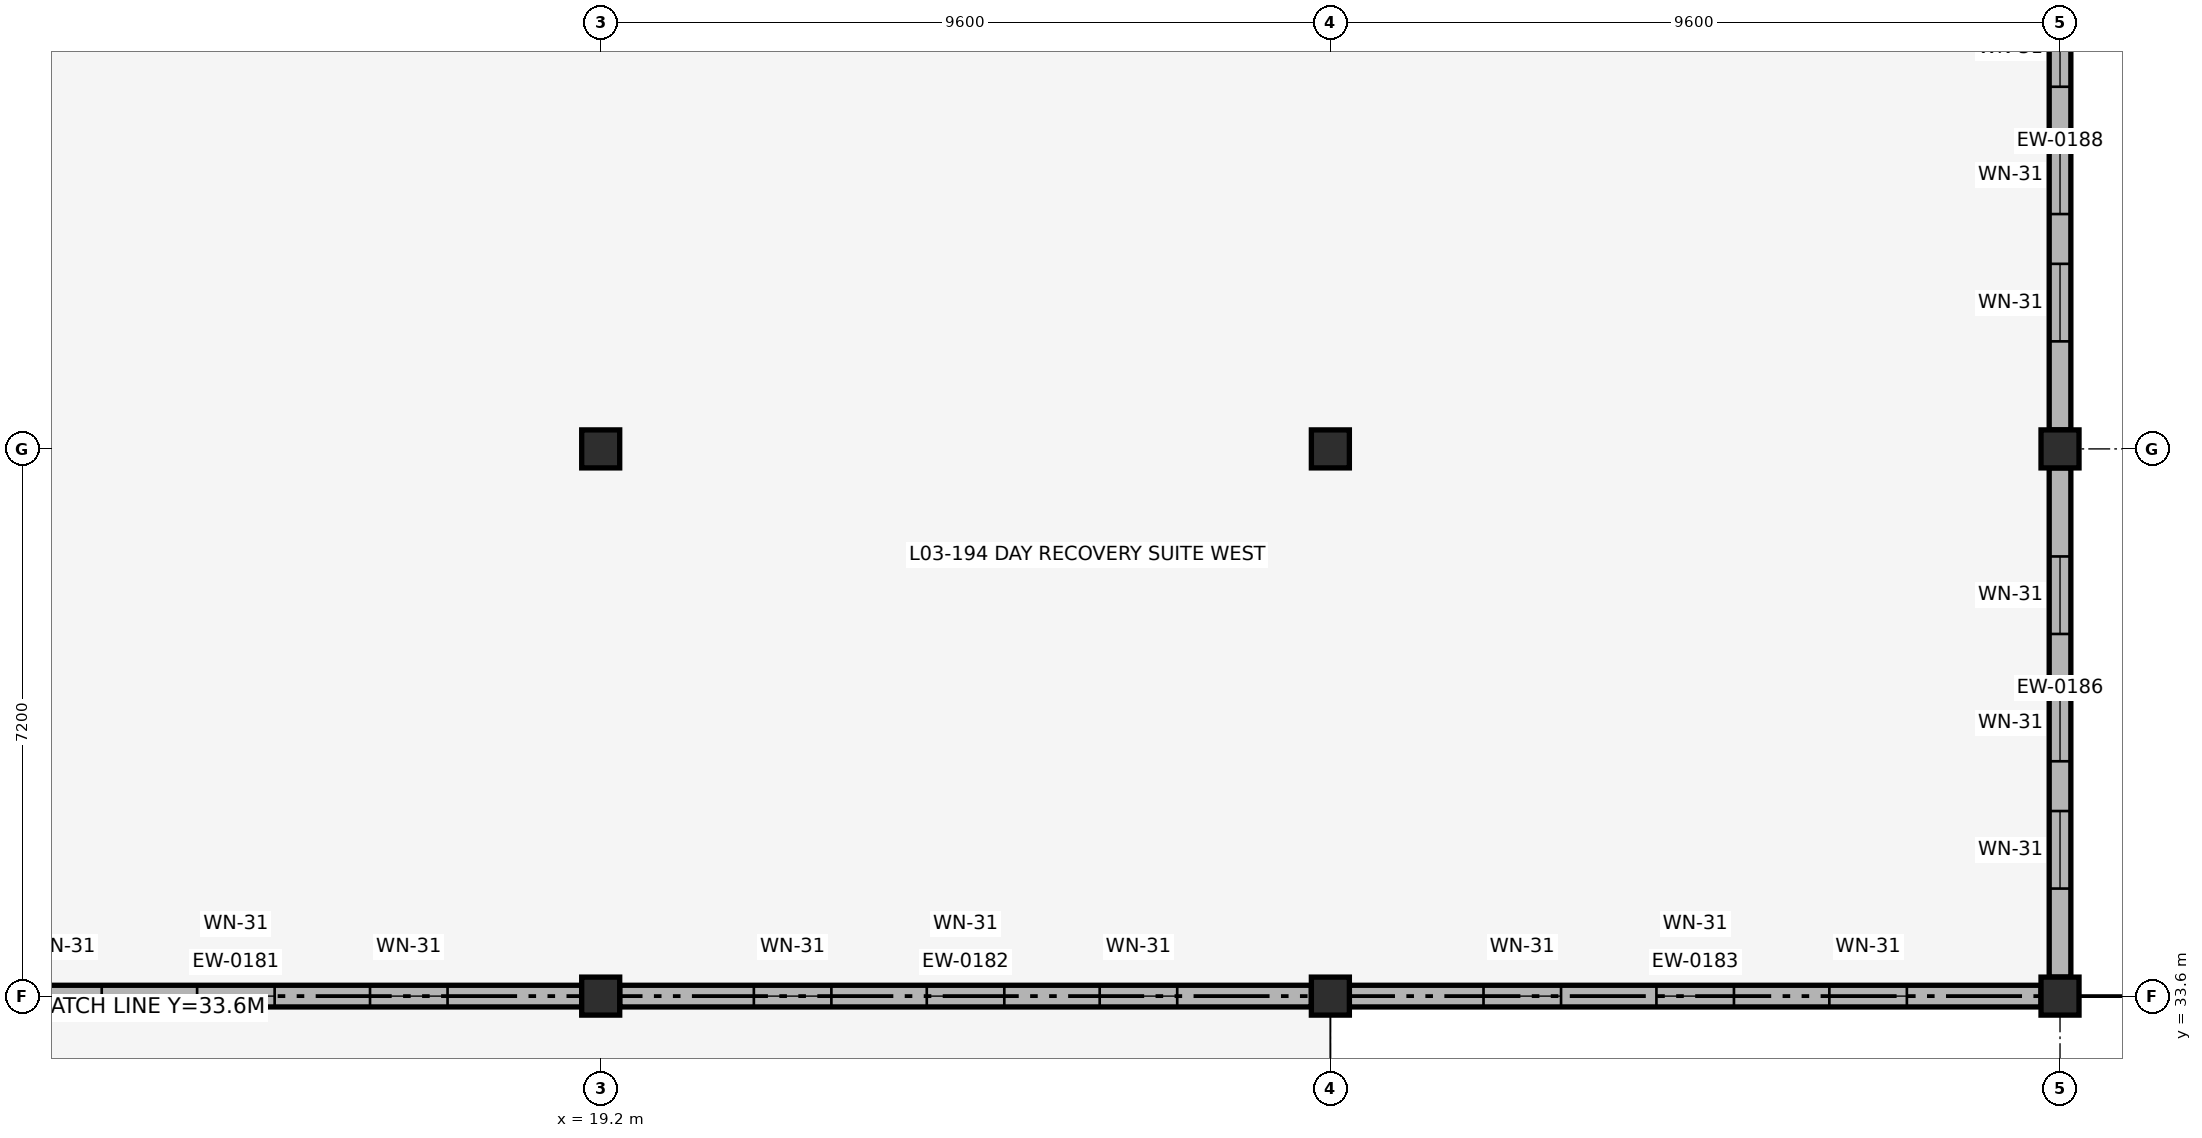
"""IFC4 building model, lengths in metres.
Left out: names, types, materials, properties, quantities, classifications, styles, units other than length and angle.
Written with IfcOpenShell. Run it as: python <this file> out.ifc"""

import sys

from ifc_helpers import new_model, si_unit, direction, frame, frame_2d, origin, origin_2d, place, context, subcontext, project, spatial, rectangle, extrude, element, fill, save


model = new_model("IFC4")
c1 = context("Model", 3, precision=1e-05, world=origin(), true_north=direction((0.0, 1.0)))
c2 = subcontext(c1, "Body", "Model", "MODEL_VIEW")
j1 = project(units=[si_unit("LENGTHUNIT", "METRE"), si_unit("PLANEANGLEUNIT", "RADIAN")], contexts=[c1])
p1 = place(None, origin())
s1 = spatial("IfcSite", under=j1, at=p1, CompositionType="ELEMENT")
p2 = place(p1, origin())
s2 = spatial("IfcBuilding", under=s1, at=p2, CompositionType="ELEMENT")
p3 = place(p2, frame((0.0, 0.0, 12.58)))
s3 = spatial("IfcBuildingStorey", under=s2, at=p3, CompositionType="ELEMENT", Elevation=12.58)
for number, where, z_axis, x_axis in (
    (1, (19.2, 33.6, 0.0), (0.0, 0.0, 1.0), (1.0, 0.0, 0.0)),
    (2, (19.2, 40.8, 0.0), (0.0, 0.0, 1.0), (1.0, 0.0, 0.0)),
    (3, (28.8, 33.6, 0.0), (0.0, 0.0, 1.0), (1.0, 0.0, 0.0)),
    (4, (28.8, 40.8, 0.0), (0.0, 0.0, 1.0), (1.0, 0.0, 0.0)),
    (5, (38.4, 33.6, 0.0), (0.0, 0.0, 1.0), (1.0, 0.0, 0.0)),
    (6, (38.4, 40.8, 0.0), (0.0, 0.0, 1.0), (1.0, 0.0, 0.0)),
):
    element("IfcColumn", number, at=place(p3, frame(where, z_axis=z_axis, x_axis=x_axis)), inside=s3, PredefinedType="COLUMN", context=c2, shape_type="SweptSolid", body=[
        extrude(rectangle(XDim=0.5, YDim=0.5, at=origin_2d()), origin(), (0.0, 0.0, 1.0), 4.08),
    ])
p4 = place(p3, frame((9.85, 33.6, 0.0), z_axis=(0.0, 0.0, 1.0), x_axis=(1.0, 0.0, 0.0)))
e7 = element("IfcWall", 7, at=p4, inside=s3, PredefinedType="SOLIDWALL", context=c2, shape_type="SweptSolid", body=[
    extrude(rectangle(XDim=9.1, YDim=0.285, at=frame_2d((4.55, 0.0))), origin(), (0.0, 0.0, 1.0), 3.06),
])
p5 = place(p4, frame((1.765, 0.0, 0.88)))
e8 = element("IfcOpeningElement", 8, at=p5, cuts=e7, PredefinedType="OPENING", context=c2, shape_type="SweptSolid", body=[
    extrude(rectangle(XDim=1.02, YDim=1.88, at=frame_2d((0.51, 0.94))), frame((0.0, 0.152, 0.0), z_axis=(0.0, -1.0, 0.0), x_axis=(1.0, 0.0, 0.0)), (0.0, 0.0, 1.0), 0.305),
])
p6 = place(p4, frame((4.04, 0.0, 0.88)))
e9 = element("IfcOpeningElement", 9, at=p6, cuts=e7, PredefinedType="OPENING", context=c2, shape_type="SweptSolid", body=[
    extrude(rectangle(XDim=1.02, YDim=1.88, at=frame_2d((0.51, 0.94))), frame((0.0, 0.152, 0.0), z_axis=(0.0, -1.0, 0.0), x_axis=(1.0, 0.0, 0.0)), (0.0, 0.0, 1.0), 0.305),
])
p7 = place(p4, frame((6.315, 0.0, 0.88)))
e10 = element("IfcOpeningElement", 10, at=p7, cuts=e7, PredefinedType="OPENING", context=c2, shape_type="SweptSolid", body=[
    extrude(rectangle(XDim=1.02, YDim=1.88, at=frame_2d((0.51, 0.94))), frame((0.0, 0.152, 0.0), z_axis=(0.0, -1.0, 0.0), x_axis=(1.0, 0.0, 0.0)), (0.0, 0.0, 1.0), 0.305),
])
p8 = place(p3, frame((19.45, 33.6, 0.0), z_axis=(0.0, 0.0, 1.0), x_axis=(1.0, 0.0, 0.0)))
e11 = element("IfcWall", 11, at=p8, inside=s3, PredefinedType="SOLIDWALL", context=c2, shape_type="SweptSolid", body=[
    extrude(rectangle(XDim=9.1, YDim=0.285, at=frame_2d((4.55, 0.0))), origin(), (0.0, 0.0, 1.0), 3.06),
])
p9 = place(p8, frame((1.765, 0.0, 0.88)))
e12 = element("IfcOpeningElement", 12, at=p9, cuts=e11, PredefinedType="OPENING", context=c2, shape_type="SweptSolid", body=[
    extrude(rectangle(XDim=1.02, YDim=1.88, at=frame_2d((0.51, 0.94))), frame((0.0, 0.152, 0.0), z_axis=(0.0, -1.0, 0.0), x_axis=(1.0, 0.0, 0.0)), (0.0, 0.0, 1.0), 0.305),
])
p10 = place(p8, frame((4.04, 0.0, 0.88)))
e13 = element("IfcOpeningElement", 13, at=p10, cuts=e11, PredefinedType="OPENING", context=c2, shape_type="SweptSolid", body=[
    extrude(rectangle(XDim=1.02, YDim=1.88, at=frame_2d((0.51, 0.94))), frame((0.0, 0.152, 0.0), z_axis=(0.0, -1.0, 0.0), x_axis=(1.0, 0.0, 0.0)), (0.0, 0.0, 1.0), 0.305),
])
p11 = place(p8, frame((6.315, 0.0, 0.88)))
e14 = element("IfcOpeningElement", 14, at=p11, cuts=e11, PredefinedType="OPENING", context=c2, shape_type="SweptSolid", body=[
    extrude(rectangle(XDim=1.02, YDim=1.88, at=frame_2d((0.51, 0.94))), frame((0.0, 0.152, 0.0), z_axis=(0.0, -1.0, 0.0), x_axis=(1.0, 0.0, 0.0)), (0.0, 0.0, 1.0), 0.305),
])
p12 = place(p3, frame((29.05, 33.6, 0.0), z_axis=(0.0, 0.0, 1.0), x_axis=(1.0, 0.0, 0.0)))
e15 = element("IfcWall", 15, at=p12, inside=s3, PredefinedType="SOLIDWALL", context=c2, shape_type="SweptSolid", body=[
    extrude(rectangle(XDim=9.1, YDim=0.285, at=frame_2d((4.55, 0.0))), origin(), (0.0, 0.0, 1.0), 3.06),
])
p13 = place(p12, frame((1.765, 0.0, 0.88)))
e16 = element("IfcOpeningElement", 16, at=p13, cuts=e15, PredefinedType="OPENING", context=c2, shape_type="SweptSolid", body=[
    extrude(rectangle(XDim=1.02, YDim=1.88, at=frame_2d((0.51, 0.94))), frame((0.0, 0.152, 0.0), z_axis=(0.0, -1.0, 0.0), x_axis=(1.0, 0.0, 0.0)), (0.0, 0.0, 1.0), 0.305),
])
p14 = place(p12, frame((4.04, 0.0, 0.88)))
e17 = element("IfcOpeningElement", 17, at=p14, cuts=e15, PredefinedType="OPENING", context=c2, shape_type="SweptSolid", body=[
    extrude(rectangle(XDim=1.02, YDim=1.88, at=frame_2d((0.51, 0.94))), frame((0.0, 0.152, 0.0), z_axis=(0.0, -1.0, 0.0), x_axis=(1.0, 0.0, 0.0)), (0.0, 0.0, 1.0), 0.305),
])
p15 = place(p12, frame((6.315, 0.0, 0.88)))
e18 = element("IfcOpeningElement", 18, at=p15, cuts=e15, PredefinedType="OPENING", context=c2, shape_type="SweptSolid", body=[
    extrude(rectangle(XDim=1.02, YDim=1.88, at=frame_2d((0.51, 0.94))), frame((0.0, 0.152, 0.0), z_axis=(0.0, -1.0, 0.0), x_axis=(1.0, 0.0, 0.0)), (0.0, 0.0, 1.0), 0.305),
])
p16 = place(p3, frame((38.4, 33.85, 0.0), z_axis=(0.0, 0.0, 1.0), x_axis=(0.0, 1.0, 0.0)))
e19 = element("IfcWall", 19, at=p16, inside=s3, PredefinedType="SOLIDWALL", context=c2, shape_type="SweptSolid", body=[
    extrude(rectangle(XDim=6.7, YDim=0.285, at=frame_2d((3.35, 0.0))), origin(), (0.0, 0.0, 1.0), 3.06),
])
p17 = place(p16, frame((1.165, 0.0, 0.88)))
e20 = element("IfcOpeningElement", 20, at=p17, cuts=e19, PredefinedType="OPENING", context=c2, shape_type="SweptSolid", body=[
    extrude(rectangle(XDim=1.02, YDim=1.88, at=frame_2d((0.51, 0.94))), frame((0.0, 0.152, 0.0), z_axis=(0.0, -1.0, 0.0), x_axis=(1.0, 0.0, 0.0)), (0.0, 0.0, 1.0), 0.305),
])
p18 = place(p16, frame((2.84, 0.0, 0.88)))
e21 = element("IfcOpeningElement", 21, at=p18, cuts=e19, PredefinedType="OPENING", context=c2, shape_type="SweptSolid", body=[
    extrude(rectangle(XDim=1.02, YDim=1.88, at=frame_2d((0.51, 0.94))), frame((0.0, 0.152, 0.0), z_axis=(0.0, -1.0, 0.0), x_axis=(1.0, 0.0, 0.0)), (0.0, 0.0, 1.0), 0.305),
])
p19 = place(p16, frame((4.515, 0.0, 0.88)))
e22 = element("IfcOpeningElement", 22, at=p19, cuts=e19, PredefinedType="OPENING", context=c2, shape_type="SweptSolid", body=[
    extrude(rectangle(XDim=1.02, YDim=1.88, at=frame_2d((0.51, 0.94))), frame((0.0, 0.152, 0.0), z_axis=(0.0, -1.0, 0.0), x_axis=(1.0, 0.0, 0.0)), (0.0, 0.0, 1.0), 0.305),
])
p20 = place(p3, frame((38.4, 41.05, 0.0), z_axis=(0.0, 0.0, 1.0), x_axis=(0.0, 1.0, 0.0)))
e23 = element("IfcWall", 23, at=p20, inside=s3, PredefinedType="SOLIDWALL", context=c2, shape_type="SweptSolid", body=[
    extrude(rectangle(XDim=6.7, YDim=0.285, at=frame_2d((3.35, 0.0))), origin(), (0.0, 0.0, 1.0), 3.06),
])
p21 = place(p20, frame((1.165, 0.0, 0.88)))
e24 = element("IfcOpeningElement", 24, at=p21, cuts=e23, PredefinedType="OPENING", context=c2, shape_type="SweptSolid", body=[
    extrude(rectangle(XDim=1.02, YDim=1.88, at=frame_2d((0.51, 0.94))), frame((0.0, 0.152, 0.0), z_axis=(0.0, -1.0, 0.0), x_axis=(1.0, 0.0, 0.0)), (0.0, 0.0, 1.0), 0.305),
])
p22 = place(p20, frame((2.84, 0.0, 0.88)))
e25 = element("IfcOpeningElement", 25, at=p22, cuts=e23, PredefinedType="OPENING", context=c2, shape_type="SweptSolid", body=[
    extrude(rectangle(XDim=1.02, YDim=1.88, at=frame_2d((0.51, 0.94))), frame((0.0, 0.152, 0.0), z_axis=(0.0, -1.0, 0.0), x_axis=(1.0, 0.0, 0.0)), (0.0, 0.0, 1.0), 0.305),
])
p23 = place(p20, frame((4.515, 0.0, 0.88)))
e26 = element("IfcOpeningElement", 26, at=p23, cuts=e23, PredefinedType="OPENING", context=c2, shape_type="SweptSolid", body=[
    extrude(rectangle(XDim=1.02, YDim=1.88, at=frame_2d((0.51, 0.94))), frame((0.0, 0.152, 0.0), z_axis=(0.0, -1.0, 0.0), x_axis=(1.0, 0.0, 0.0)), (0.0, 0.0, 1.0), 0.305),
])
p24 = place(p5, origin())
e27 = element("IfcWindow", 27, at=p24, inside=s3, PartitioningType="SINGLE_PANEL", PredefinedType="WINDOW", context=c2, shape_type="SweptSolid", body=[
    extrude(rectangle(XDim=1.02, YDim=1.88, at=frame_2d((0.51, 0.94))), frame((0.0, 0.03, 0.0), z_axis=(0.0, -1.0, 0.0), x_axis=(1.0, 0.0, 0.0)), (0.0, 0.0, 1.0), 0.06),
])
fill(e8, e27)
p25 = place(p6, origin())
e28 = element("IfcWindow", 28, at=p25, inside=s3, PartitioningType="SINGLE_PANEL", PredefinedType="WINDOW", context=c2, shape_type="SweptSolid", body=[
    extrude(rectangle(XDim=1.02, YDim=1.88, at=frame_2d((0.51, 0.94))), frame((0.0, 0.03, 0.0), z_axis=(0.0, -1.0, 0.0), x_axis=(1.0, 0.0, 0.0)), (0.0, 0.0, 1.0), 0.06),
])
fill(e9, e28)
p26 = place(p7, origin())
e29 = element("IfcWindow", 29, at=p26, inside=s3, PartitioningType="SINGLE_PANEL", PredefinedType="WINDOW", context=c2, shape_type="SweptSolid", body=[
    extrude(rectangle(XDim=1.02, YDim=1.88, at=frame_2d((0.51, 0.94))), frame((0.0, 0.03, 0.0), z_axis=(0.0, -1.0, 0.0), x_axis=(1.0, 0.0, 0.0)), (0.0, 0.0, 1.0), 0.06),
])
fill(e10, e29)
p27 = place(p9, origin())
e30 = element("IfcWindow", 30, at=p27, inside=s3, PartitioningType="SINGLE_PANEL", PredefinedType="WINDOW", context=c2, shape_type="SweptSolid", body=[
    extrude(rectangle(XDim=1.02, YDim=1.88, at=frame_2d((0.51, 0.94))), frame((0.0, 0.03, 0.0), z_axis=(0.0, -1.0, 0.0), x_axis=(1.0, 0.0, 0.0)), (0.0, 0.0, 1.0), 0.06),
])
fill(e12, e30)
p28 = place(p10, origin())
e31 = element("IfcWindow", 31, at=p28, inside=s3, PartitioningType="SINGLE_PANEL", PredefinedType="WINDOW", context=c2, shape_type="SweptSolid", body=[
    extrude(rectangle(XDim=1.02, YDim=1.88, at=frame_2d((0.51, 0.94))), frame((0.0, 0.03, 0.0), z_axis=(0.0, -1.0, 0.0), x_axis=(1.0, 0.0, 0.0)), (0.0, 0.0, 1.0), 0.06),
])
fill(e13, e31)
p29 = place(p11, origin())
e32 = element("IfcWindow", 32, at=p29, inside=s3, PartitioningType="SINGLE_PANEL", PredefinedType="WINDOW", context=c2, shape_type="SweptSolid", body=[
    extrude(rectangle(XDim=1.02, YDim=1.88, at=frame_2d((0.51, 0.94))), frame((0.0, 0.03, 0.0), z_axis=(0.0, -1.0, 0.0), x_axis=(1.0, 0.0, 0.0)), (0.0, 0.0, 1.0), 0.06),
])
fill(e14, e32)
p30 = place(p13, origin())
e33 = element("IfcWindow", 33, at=p30, inside=s3, PartitioningType="SINGLE_PANEL", PredefinedType="WINDOW", context=c2, shape_type="SweptSolid", body=[
    extrude(rectangle(XDim=1.02, YDim=1.88, at=frame_2d((0.51, 0.94))), frame((0.0, 0.03, 0.0), z_axis=(0.0, -1.0, 0.0), x_axis=(1.0, 0.0, 0.0)), (0.0, 0.0, 1.0), 0.06),
])
fill(e16, e33)
p31 = place(p14, origin())
e34 = element("IfcWindow", 34, at=p31, inside=s3, PartitioningType="SINGLE_PANEL", PredefinedType="WINDOW", context=c2, shape_type="SweptSolid", body=[
    extrude(rectangle(XDim=1.02, YDim=1.88, at=frame_2d((0.51, 0.94))), frame((0.0, 0.03, 0.0), z_axis=(0.0, -1.0, 0.0), x_axis=(1.0, 0.0, 0.0)), (0.0, 0.0, 1.0), 0.06),
])
fill(e17, e34)
p32 = place(p15, origin())
e35 = element("IfcWindow", 35, at=p32, inside=s3, PartitioningType="SINGLE_PANEL", PredefinedType="WINDOW", context=c2, shape_type="SweptSolid", body=[
    extrude(rectangle(XDim=1.02, YDim=1.88, at=frame_2d((0.51, 0.94))), frame((0.0, 0.03, 0.0), z_axis=(0.0, -1.0, 0.0), x_axis=(1.0, 0.0, 0.0)), (0.0, 0.0, 1.0), 0.06),
])
fill(e18, e35)
p33 = place(p17, origin())
e36 = element("IfcWindow", 36, at=p33, inside=s3, PartitioningType="SINGLE_PANEL", PredefinedType="WINDOW", context=c2, shape_type="SweptSolid", body=[
    extrude(rectangle(XDim=1.02, YDim=1.88, at=frame_2d((0.51, 0.94))), frame((0.0, 0.03, 0.0), z_axis=(0.0, -1.0, 0.0), x_axis=(1.0, 0.0, 0.0)), (0.0, 0.0, 1.0), 0.06),
])
fill(e20, e36)
p34 = place(p18, origin())
e37 = element("IfcWindow", 37, at=p34, inside=s3, PartitioningType="SINGLE_PANEL", PredefinedType="WINDOW", context=c2, shape_type="SweptSolid", body=[
    extrude(rectangle(XDim=1.02, YDim=1.88, at=frame_2d((0.51, 0.94))), frame((0.0, 0.03, 0.0), z_axis=(0.0, -1.0, 0.0), x_axis=(1.0, 0.0, 0.0)), (0.0, 0.0, 1.0), 0.06),
])
fill(e21, e37)
p35 = place(p19, origin())
e38 = element("IfcWindow", 38, at=p35, inside=s3, PartitioningType="SINGLE_PANEL", PredefinedType="WINDOW", context=c2, shape_type="SweptSolid", body=[
    extrude(rectangle(XDim=1.02, YDim=1.88, at=frame_2d((0.51, 0.94))), frame((0.0, 0.03, 0.0), z_axis=(0.0, -1.0, 0.0), x_axis=(1.0, 0.0, 0.0)), (0.0, 0.0, 1.0), 0.06),
])
fill(e22, e38)
p36 = place(p21, origin())
e39 = element("IfcWindow", 39, at=p36, inside=s3, PartitioningType="SINGLE_PANEL", PredefinedType="WINDOW", context=c2, shape_type="SweptSolid", body=[
    extrude(rectangle(XDim=1.02, YDim=1.88, at=frame_2d((0.51, 0.94))), frame((0.0, 0.03, 0.0), z_axis=(0.0, -1.0, 0.0), x_axis=(1.0, 0.0, 0.0)), (0.0, 0.0, 1.0), 0.06),
])
fill(e24, e39)
p37 = place(p22, origin())
e40 = element("IfcWindow", 40, at=p37, inside=s3, PartitioningType="SINGLE_PANEL", PredefinedType="WINDOW", context=c2, shape_type="SweptSolid", body=[
    extrude(rectangle(XDim=1.02, YDim=1.88, at=frame_2d((0.51, 0.94))), frame((0.0, 0.03, 0.0), z_axis=(0.0, -1.0, 0.0), x_axis=(1.0, 0.0, 0.0)), (0.0, 0.0, 1.0), 0.06),
])
fill(e25, e40)
p38 = place(p23, origin())
e41 = element("IfcWindow", 41, at=p38, inside=s3, PartitioningType="SINGLE_PANEL", PredefinedType="WINDOW", context=c2, shape_type="SweptSolid", body=[
    extrude(rectangle(XDim=1.02, YDim=1.88, at=frame_2d((0.51, 0.94))), frame((0.0, 0.03, 0.0), z_axis=(0.0, -1.0, 0.0), x_axis=(1.0, 0.0, 0.0)), (0.0, 0.0, 1.0), 0.06),
])
fill(e26, e41)
save(model, sys.argv[1])
